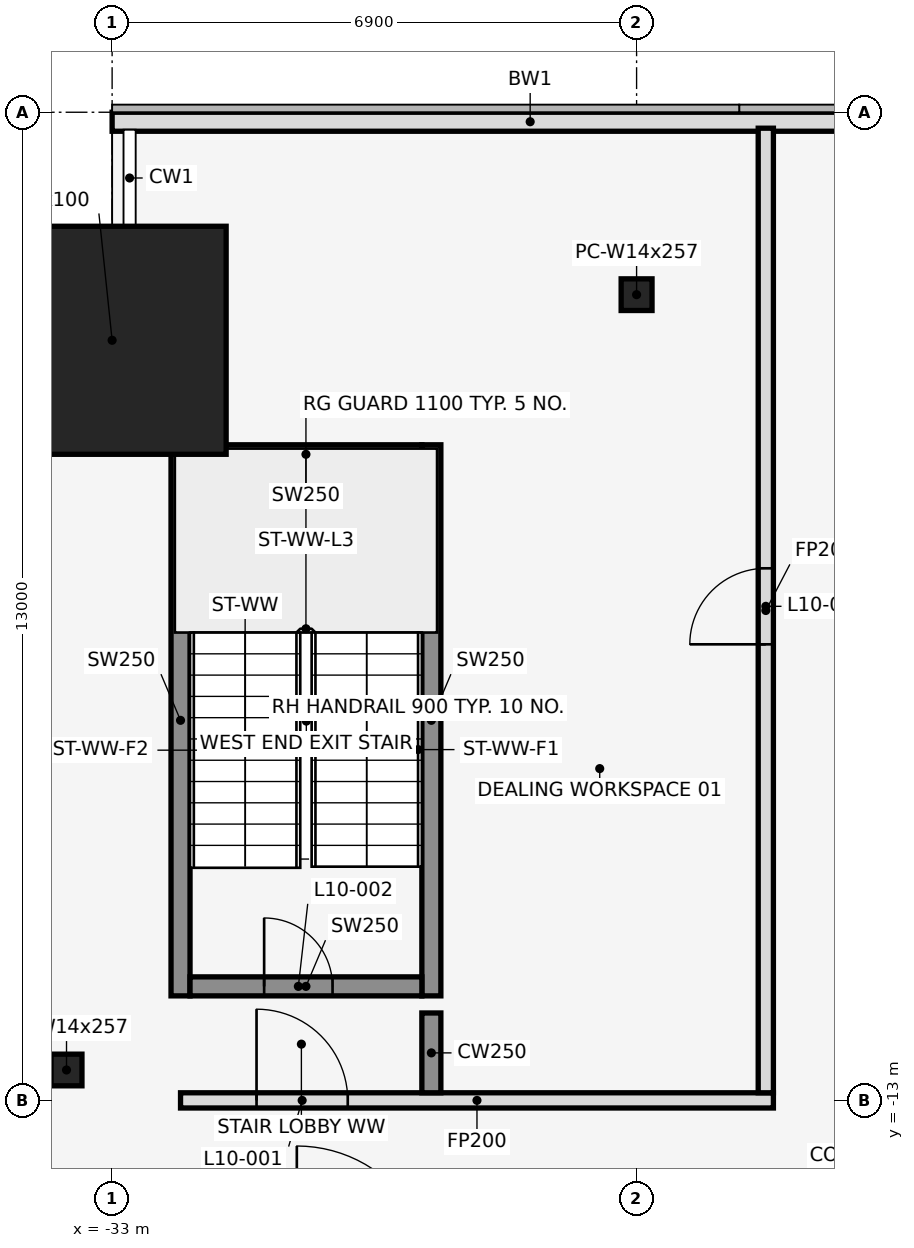
"""IFC4 building model, lengths in metres.
Left out: names, types, materials, properties, quantities, classifications, styles, units other than length and angle.
Written with IfcOpenShell. Run it as: python <this file> out.ifc"""

import sys

from ifc_helpers import new_model, si_unit, direction, frame, frame_2d, origin, origin_2d, place, context, subcontext, project, spatial, rectangle, hollow_rectangle, i_section, extrude, element, fill, save


model = new_model("IFC4")
c1 = context("Model", 3, precision=1e-05, world=origin(), true_north=direction((0.0, 1.0)))
c2 = subcontext(c1, "Body", "Model", "MODEL_VIEW")
j1 = project(units=[si_unit("LENGTHUNIT", "METRE"), si_unit("PLANEANGLEUNIT", "RADIAN")], contexts=[c1])
p1 = place(None, origin())
s1 = spatial("IfcSite", under=j1, at=p1, CompositionType="ELEMENT")
p2 = place(p1, origin())
s2 = spatial("IfcBuilding", under=s1, at=p2, CompositionType="ELEMENT")
p3 = place(p2, frame((0.0, 0.0, 53.0)))
s3 = spatial("IfcBuildingStorey", under=s2, at=p3, CompositionType="ELEMENT", Elevation=53.0)
p4 = place(p3, frame((-33.0, -3.0, 0.0), z_axis=(0.0, 0.0, 1.0), x_axis=(1.0, 0.0, 0.0)))
e1 = element("IfcColumn", 1, at=p4, inside=s3, PredefinedType="COLUMN", context=c2, shape_type="SweptSolid", body=[
    extrude(hollow_rectangle(XDim=3.0, YDim=3.0, WallThickness=0.1, at=origin_2d()), origin(), (0.0, 0.0, 1.0), 4.5),
])
for number, where, z_axis, x_axis in (
    (2, (-26.1, -2.4, 0.0), (0.0, 0.0, 1.0), (1.0, 0.0, 0.0)),
    (3, (-33.6, -12.6, 0.0), (0.0, 0.0, 1.0), (1.0, 0.0, 0.0)),
):
    element("IfcColumn", number, at=place(p3, frame(where, z_axis=z_axis, x_axis=x_axis)), inside=s3, PredefinedType="COLUMN", context=c2, shape_type="SweptSolid", body=[
        extrude(i_section(OverallWidth=0.406, OverallDepth=0.417, WebThickness=0.03, FlangeThickness=0.048, at=origin_2d()), origin(), (0.0, 0.0, 1.0), 4.5),
    ])
p5 = place(p3, frame((-22.0, -0.125, 0.0), z_axis=(0.0, 0.0, 1.0), x_axis=(-1.0, 0.0, 0.0)))
e4 = element("IfcWall", 4, at=p5, inside=s3, PredefinedType="STANDARD", context=c2, shape_type="SweptSolid", body=[
    extrude(rectangle(XDim=11.0, YDim=0.25, at=frame_2d((5.5, 0.0))), origin(), (0.0, 0.0, 1.0), 4.35),
])
for number, where, z_axis, x_axis in (
    (5, (-32.1, -11.625, 0.0), (0.0, 0.0, 1.0), (0.0, 1.0, 0.0)),
    (6, (-28.8, -11.625, 0.0), (0.0, 0.0, 1.0), (0.0, 1.0, 0.0)),
):
    element("IfcWall", number, at=place(p3, frame(where, z_axis=z_axis, x_axis=x_axis)), inside=s3, PredefinedType="SHEAR", context=c2, shape_type="SweptSolid", body=[
        extrude(rectangle(XDim=7.25, YDim=0.25, at=frame_2d((3.625, 0.0))), origin(), (0.0, 0.0, 1.0), 4.5),
    ])
p6 = place(p3, frame((-31.975, -11.5, 0.0), z_axis=(0.0, 0.0, 1.0), x_axis=(1.0, 0.0, 0.0)))
e7 = element("IfcWall", 7, at=p6, inside=s3, PredefinedType="SHEAR", context=c2, shape_type="SweptSolid", body=[
    extrude(rectangle(XDim=3.05, YDim=0.25, at=frame_2d((1.525, 0.0))), origin(), (0.0, 0.0, 1.0), 4.5),
])
p7 = place(p6, frame((0.975, 0.0, 0.0)))
e8 = element("IfcOpeningElement", 8, at=p7, cuts=e7, PredefinedType="OPENING", context=c2, shape_type="SweptSolid", body=[
    extrude(rectangle(XDim=0.9, YDim=2.1, at=frame_2d((0.45, 1.05))), frame((0.0, 0.137, 0.0), z_axis=(0.0, -1.0, 0.0), x_axis=(1.0, 0.0, 0.0)), (0.0, 0.0, 1.0), 0.274),
])
p8 = place(p3, frame((-31.975, -4.5, 0.0), z_axis=(0.0, 0.0, 1.0), x_axis=(1.0, 0.0, 0.0)))
e9 = element("IfcWall", 9, at=p8, inside=s3, PredefinedType="SHEAR", context=c2, shape_type="SweptSolid", body=[
    extrude(rectangle(XDim=3.05, YDim=0.25, at=frame_2d((1.525, 0.0))), origin(), (0.0, 0.0, 1.0), 4.5),
])
p9 = place(p3, frame((-32.1, -13.0, 0.0), z_axis=(0.0, 0.0, 1.0), x_axis=(1.0, 0.0, 0.0)))
e10 = element("IfcWall", 10, at=p9, inside=s3, PredefinedType="PARTITIONING", context=c2, shape_type="SweptSolid", body=[
    extrude(rectangle(XDim=7.8, YDim=0.2, at=frame_2d((3.9, 0.0))), origin(), (0.0, 0.0, 1.0), 3.418),
])
p10 = place(p9, frame((1.0, 0.0, 0.0)))
e11 = element("IfcOpeningElement", 11, at=p10, cuts=e10, PredefinedType="OPENING", context=c2, shape_type="SweptSolid", body=[
    extrude(rectangle(XDim=1.2, YDim=2.1, at=frame_2d((0.6, 1.05))), frame((0.0, 0.112, 0.0), z_axis=(0.0, -1.0, 0.0), x_axis=(1.0, 0.0, 0.0)), (0.0, 0.0, 1.0), 0.224),
])
p11 = place(p3, frame((-28.8, -12.9, 0.0), z_axis=(0.0, 0.0, 1.0), x_axis=(0.0, 1.0, 0.0)))
e12 = element("IfcWall", 12, at=p11, inside=s3, PredefinedType="SHEAR", context=c2, shape_type="SweptSolid", body=[
    extrude(rectangle(XDim=1.05, YDim=0.25, at=frame_2d((0.525, 0.0))), origin(), (0.0, 0.0, 1.0), 4.5),
])
p12 = place(p3, frame((-24.4, -12.9, 0.0), z_axis=(0.0, 0.0, 1.0), x_axis=(0.0, 1.0, 0.0)))
e13 = element("IfcWall", 13, at=p12, inside=s3, PredefinedType="PARTITIONING", context=c2, shape_type="SweptSolid", body=[
    extrude(rectangle(XDim=12.69, YDim=0.2, at=frame_2d((6.345, 0.0))), origin(), (0.0, 0.0, 1.0), 3.418),
])
p13 = place(p12, frame((5.9, 0.0, 0.0)))
e14 = element("IfcOpeningElement", 14, at=p13, cuts=e13, PredefinedType="OPENING", context=c2, shape_type="SweptSolid", body=[
    extrude(rectangle(XDim=1.0, YDim=2.1, at=frame_2d((0.5, 1.05))), frame((0.0, 0.112, 0.0), z_axis=(0.0, -1.0, 0.0), x_axis=(1.0, 0.0, 0.0)), (0.0, 0.0, 1.0), 0.224),
])
p14 = place(p10, origin())
e15 = element("IfcDoor", 15, at=p14, inside=s3, OperationType="SINGLE_SWING_LEFT", PredefinedType="DOOR", context=c2, shape_type="SweptSolid", body=[
    extrude(rectangle(XDim=1.2, YDim=2.1, at=frame_2d((0.6, 1.05))), frame((0.0, 0.025, 0.0), z_axis=(0.0, -1.0, 0.0), x_axis=(1.0, 0.0, 0.0)), (0.0, 0.0, 1.0), 0.05),
])
fill(e11, e15)
p15 = place(p7, origin())
e16 = element("IfcDoor", 16, at=p15, inside=s3, OperationType="SINGLE_SWING_LEFT", PredefinedType="DOOR", context=c2, shape_type="SweptSolid", body=[
    extrude(rectangle(XDim=0.9, YDim=2.1, at=frame_2d((0.45, 1.05))), frame((0.0, 0.025, 0.0), z_axis=(0.0, -1.0, 0.0), x_axis=(1.0, 0.0, 0.0)), (0.0, 0.0, 1.0), 0.05),
])
fill(e8, e16)
p16 = place(p13, origin())
e17 = element("IfcDoor", 17, at=p16, inside=s3, OperationType="SINGLE_SWING_LEFT", PredefinedType="DOOR", context=c2, shape_type="SweptSolid", body=[
    extrude(rectangle(XDim=1.0, YDim=2.1, at=frame_2d((0.5, 1.05))), frame((0.0, 0.025, 0.0), z_axis=(0.0, -1.0, 0.0), x_axis=(1.0, 0.0, 0.0)), (0.0, 0.0, 1.0), 0.05),
])
fill(e14, e17)
save(model, sys.argv[1])
